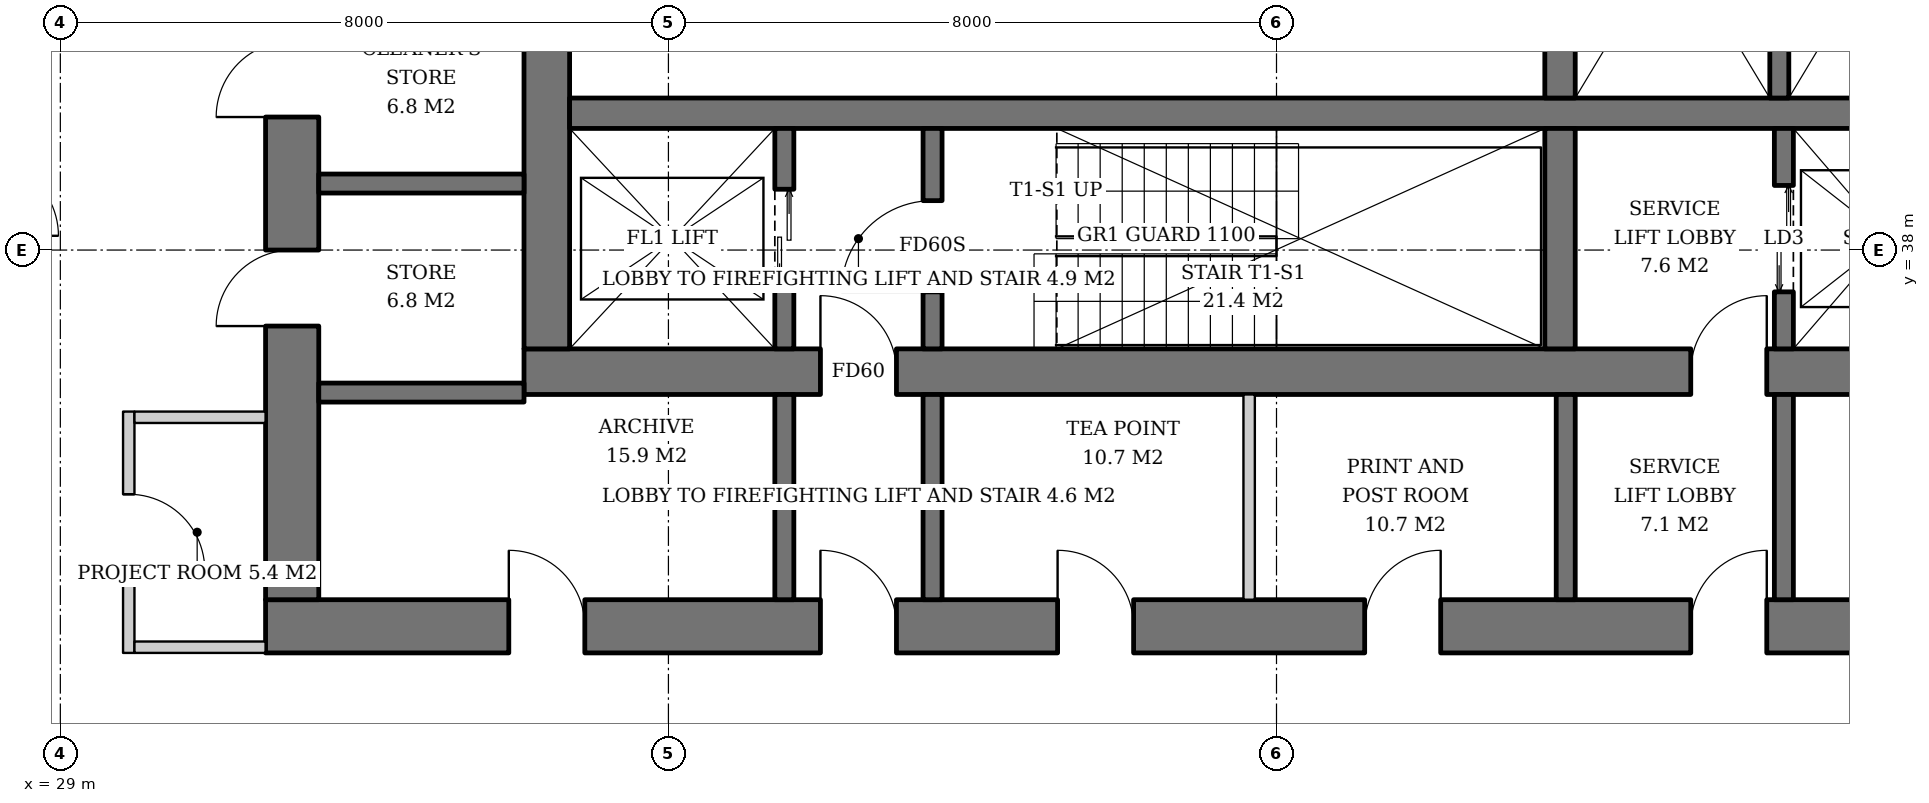
"""IFC4 building model, lengths in metres.
Left out: names, types, materials, properties, quantities, classifications, styles, units other than length and angle.
Written with IfcOpenShell. Run it as: python <this file> out.ifc"""

import sys

from ifc_helpers import new_model, si_unit, direction, frame, frame_2d, origin, place, context, subcontext, project, spatial, rectangle, extrude, element, fill, save


model = new_model("IFC4")
c1 = context("Model", 3, precision=1e-05, world=origin(), true_north=direction((0.0, 1.0)))
c2 = subcontext(c1, "Body", "Model", "MODEL_VIEW")
j1 = project(units=[si_unit("LENGTHUNIT", "METRE"), si_unit("PLANEANGLEUNIT", "RADIAN")], contexts=[c1])
p1 = place(None, origin())
s1 = spatial("IfcSite", under=j1, at=p1, CompositionType="ELEMENT")
p2 = place(p1, origin())
s2 = spatial("IfcBuilding", under=s1, at=p2, CompositionType="ELEMENT")
p3 = place(p2, frame((0.0, 0.0, 108.4)))
s3 = spatial("IfcBuildingStorey", under=s2, at=p3, CompositionType="ELEMENT", Elevation=108.4)
p4 = place(p3, frame((35.1, 36.4, 0.0), z_axis=(0.0, 0.0, 1.0), x_axis=(1.0, 0.0, 0.0)))
e1 = element("IfcWall", 1, at=p4, inside=s3, PredefinedType="SHEAR", context=c2, shape_type="SweptSolid", body=[
    extrude(rectangle(XDim=19.8, YDim=0.6, at=frame_2d((9.9, 0.0))), origin(), (0.0, 0.0, 1.0), 3.8),
])
p5 = place(p4, frame((3.9, 0.0, 0.0)))
e2 = element("IfcOpeningElement", 2, at=p5, cuts=e1, PredefinedType="OPENING", context=c2, shape_type="SweptSolid", body=[
    extrude(rectangle(XDim=1.0, YDim=2.1, at=frame_2d((0.5, 1.05))), frame((0.0, 0.31, 0.0), z_axis=(0.0, -1.0, 0.0), x_axis=(1.0, 0.0, 0.0)), (0.0, 0.0, 1.0), 0.62),
])
p6 = place(p4, frame((15.35, 0.0, 0.0)))
e3 = element("IfcOpeningElement", 3, at=p6, cuts=e1, PredefinedType="OPENING", context=c2, shape_type="SweptSolid", body=[
    extrude(rectangle(XDim=1.0, YDim=2.1, at=frame_2d((0.5, 1.05))), frame((0.0, 0.31, 0.0), z_axis=(0.0, -1.0, 0.0), x_axis=(1.0, 0.0, 0.0)), (0.0, 0.0, 1.0), 0.62),
])
p7 = place(p3, frame((35.4, 36.7, 0.0), z_axis=(0.0, 0.0, 1.0), x_axis=(0.0, 1.0, 0.0)))
e4 = element("IfcWall", 4, at=p7, inside=s3, PredefinedType="SHEAR", context=c2, shape_type="SweptSolid", body=[
    extrude(rectangle(XDim=18.6, YDim=0.6, at=frame_2d((9.3, 0.0))), origin(), (0.0, 0.0, 1.0), 3.8),
])
p8 = place(p7, frame((8.4, 0.0, 0.0)))
e5 = element("IfcOpeningElement", 5, at=p8, cuts=e4, PredefinedType="OPENING", context=c2, shape_type="SweptSolid", body=[
    extrude(rectangle(XDim=1.8, YDim=2.4, at=frame_2d((0.9, 1.2))), frame((0.0, 0.31, 0.0), z_axis=(0.0, -1.0, 0.0), x_axis=(1.0, 0.0, 0.0)), (0.0, 0.0, 1.0), 0.62),
])
p9 = place(p3, frame((31.7, 33.05, 0.0), z_axis=(0.0, 0.0, 1.0), x_axis=(1.0, 0.0, 0.0)))
e6 = element("IfcWall", 6, at=p9, inside=s3, PredefinedType="SHEAR", context=c2, shape_type="SweptSolid", body=[
    extrude(rectangle(XDim=26.6, YDim=0.7, at=frame_2d((13.3, 0.0))), origin(), (0.0, 0.0, 1.0), 3.8),
])
p10 = place(p9, frame((7.3, 0.0, 0.0)))
e7 = element("IfcOpeningElement", 7, at=p10, cuts=e6, PredefinedType="OPENING", context=c2, shape_type="SweptSolid", body=[
    extrude(rectangle(XDim=1.0, YDim=2.1, at=frame_2d((0.5, 1.05))), frame((0.0, 0.36, 0.0), z_axis=(0.0, -1.0, 0.0), x_axis=(1.0, 0.0, 0.0)), (0.0, 0.0, 1.0), 0.72),
])
p11 = place(p9, frame((18.75, 0.0, 0.0)))
e8 = element("IfcOpeningElement", 8, at=p11, cuts=e6, PredefinedType="OPENING", context=c2, shape_type="SweptSolid", body=[
    extrude(rectangle(XDim=1.0, YDim=2.1, at=frame_2d((0.5, 1.05))), frame((0.0, 0.36, 0.0), z_axis=(0.0, -1.0, 0.0), x_axis=(1.0, 0.0, 0.0)), (0.0, 0.0, 1.0), 0.72),
])
p12 = place(p9, frame((3.2, 0.0, 0.0)))
e9 = element("IfcOpeningElement", 9, at=p12, cuts=e6, PredefinedType="OPENING", context=c2, shape_type="SweptSolid", body=[
    extrude(rectangle(XDim=1.0, YDim=2.1, at=frame_2d((0.5, 1.05))), frame((0.0, 0.36, 0.0), z_axis=(0.0, -1.0, 0.0), x_axis=(1.0, 0.0, 0.0)), (0.0, 0.0, 1.0), 0.72),
])
p13 = place(p9, frame((10.42, 0.0, 0.0)))
e10 = element("IfcOpeningElement", 10, at=p13, cuts=e6, PredefinedType="OPENING", context=c2, shape_type="SweptSolid", body=[
    extrude(rectangle(XDim=1.0, YDim=2.1, at=frame_2d((0.5, 1.05))), frame((0.0, 0.36, 0.0), z_axis=(0.0, -1.0, 0.0), x_axis=(1.0, 0.0, 0.0)), (0.0, 0.0, 1.0), 0.72),
])
p14 = place(p9, frame((14.46, 0.0, 0.0)))
e11 = element("IfcOpeningElement", 11, at=p14, cuts=e6, PredefinedType="OPENING", context=c2, shape_type="SweptSolid", body=[
    extrude(rectangle(XDim=1.0, YDim=2.1, at=frame_2d((0.5, 1.05))), frame((0.0, 0.36, 0.0), z_axis=(0.0, -1.0, 0.0), x_axis=(1.0, 0.0, 0.0)), (0.0, 0.0, 1.0), 0.72),
])
p15 = place(p9, frame((22.5, 0.0, 0.0)))
e12 = element("IfcOpeningElement", 12, at=p15, cuts=e6, PredefinedType="OPENING", context=c2, shape_type="SweptSolid", body=[
    extrude(rectangle(XDim=1.0, YDim=2.1, at=frame_2d((0.5, 1.05))), frame((0.0, 0.36, 0.0), z_axis=(0.0, -1.0, 0.0), x_axis=(1.0, 0.0, 0.0)), (0.0, 0.0, 1.0), 0.72),
])
p16 = place(p3, frame((32.05, 33.4, 0.0), z_axis=(0.0, 0.0, 1.0), x_axis=(0.0, 1.0, 0.0)))
e13 = element("IfcWall", 13, at=p16, inside=s3, PredefinedType="SHEAR", context=c2, shape_type="SweptSolid", body=[
    extrude(rectangle(XDim=25.2, YDim=0.7, at=frame_2d((12.6, 0.0))), origin(), (0.0, 0.0, 1.0), 3.8),
])
p17 = place(p16, frame((11.7, 0.0, 0.0)))
e14 = element("IfcOpeningElement", 14, at=p17, cuts=e13, PredefinedType="OPENING", context=c2, shape_type="SweptSolid", body=[
    extrude(rectangle(XDim=1.8, YDim=2.4, at=frame_2d((0.9, 1.2))), frame((0.0, 0.36, 0.0), z_axis=(0.0, -1.0, 0.0), x_axis=(1.0, 0.0, 0.0)), (0.0, 0.0, 1.0), 0.72),
])
p18 = place(p16, frame((3.6, 0.0, 0.0)))
e15 = element("IfcOpeningElement", 15, at=p18, cuts=e13, PredefinedType="OPENING", context=c2, shape_type="SweptSolid", body=[
    extrude(rectangle(XDim=1.0, YDim=2.1, at=frame_2d((0.5, 1.05))), frame((0.0, 0.36, 0.0), z_axis=(0.0, -1.0, 0.0), x_axis=(1.0, 0.0, 0.0)), (0.0, 0.0, 1.0), 0.72),
])
p19 = place(p16, frame((6.35, 0.0, 0.0)))
e16 = element("IfcOpeningElement", 16, at=p19, cuts=e13, PredefinedType="OPENING", context=c2, shape_type="SweptSolid", body=[
    extrude(rectangle(XDim=1.0, YDim=2.1, at=frame_2d((0.5, 1.05))), frame((0.0, 0.36, 0.0), z_axis=(0.0, -1.0, 0.0), x_axis=(1.0, 0.0, 0.0)), (0.0, 0.0, 1.0), 0.72),
])
p20 = place(p16, frame((9.1, 0.0, 0.0)))
e17 = element("IfcOpeningElement", 17, at=p20, cuts=e13, PredefinedType="OPENING", context=c2, shape_type="SweptSolid", body=[
    extrude(rectangle(XDim=1.0, YDim=2.1, at=frame_2d((0.5, 1.05))), frame((0.0, 0.36, 0.0), z_axis=(0.0, -1.0, 0.0), x_axis=(1.0, 0.0, 0.0)), (0.0, 0.0, 1.0), 0.72),
])
p21 = place(p16, frame((15.1, 0.0, 0.0)))
e18 = element("IfcOpeningElement", 18, at=p21, cuts=e13, PredefinedType="OPENING", context=c2, shape_type="SweptSolid", body=[
    extrude(rectangle(XDim=1.0, YDim=2.1, at=frame_2d((0.5, 1.05))), frame((0.0, 0.36, 0.0), z_axis=(0.0, -1.0, 0.0), x_axis=(1.0, 0.0, 0.0)), (0.0, 0.0, 1.0), 0.72),
])
p22 = place(p16, frame((17.85, 0.0, 0.0)))
e19 = element("IfcOpeningElement", 19, at=p22, cuts=e13, PredefinedType="OPENING", context=c2, shape_type="SweptSolid", body=[
    extrude(rectangle(XDim=1.0, YDim=2.1, at=frame_2d((0.5, 1.05))), frame((0.0, 0.36, 0.0), z_axis=(0.0, -1.0, 0.0), x_axis=(1.0, 0.0, 0.0)), (0.0, 0.0, 1.0), 0.72),
])
p23 = place(p3, frame((35.7, 39.8, 0.0), z_axis=(0.0, 0.0, 1.0), x_axis=(1.0, 0.0, 0.0)))
e20 = element("IfcWall", 20, at=p23, inside=s3, PredefinedType="SHEAR", context=c2, shape_type="SweptSolid", body=[
    extrude(rectangle(XDim=18.6, YDim=0.4, at=frame_2d((9.3, 0.0))), origin(), (0.0, 0.0, 1.0), 3.8),
])
p24 = place(p3, frame((48.73, 36.7, 0.0), z_axis=(0.0, 0.0, 1.0), x_axis=(0.0, 1.0, 0.0)))
e21 = element("IfcWall", 21, at=p24, inside=s3, PredefinedType="SHEAR", context=c2, shape_type="SweptSolid", body=[
    extrude(rectangle(XDim=2.9, YDim=0.4, at=frame_2d((1.45, 0.0))), origin(), (0.0, 0.0, 1.0), 3.8),
])
p25 = place(p3, frame((48.73, 40.0, 0.0), z_axis=(0.0, 0.0, 1.0), x_axis=(0.0, 1.0, 0.0)))
e22 = element("IfcWall", 22, at=p25, inside=s3, PredefinedType="SHEAR", context=c2, shape_type="SweptSolid", body=[
    extrude(rectangle(XDim=12.0, YDim=0.4, at=frame_2d((6.0, 0.0))), origin(), (0.0, 0.0, 1.0), 3.8),
])
p26 = place(p3, frame((38.525, 36.7, 0.0), z_axis=(0.0, 0.0, 1.0), x_axis=(0.0, 1.0, 0.0)))
e23 = element("IfcWall", 23, at=p26, inside=s3, PredefinedType="SHEAR", context=c2, shape_type="SweptSolid", body=[
    extrude(rectangle(XDim=2.9, YDim=0.25, at=frame_2d((1.45, 0.0))), origin(), (0.0, 0.0, 1.0), 3.8),
])
p27 = place(p26, frame((0.8, 0.0, 0.0)))
e24 = element("IfcOpeningElement", 24, at=p27, cuts=e23, PredefinedType="OPENING", context=c2, shape_type="SweptSolid", body=[
    extrude(rectangle(XDim=1.3, YDim=2.2, at=frame_2d((0.65, 1.1))), frame((0.0, 0.135, 0.0), z_axis=(0.0, -1.0, 0.0), x_axis=(1.0, 0.0, 0.0)), (0.0, 0.0, 1.0), 0.27),
])
p28 = place(p3, frame((40.475, 36.7, 0.0), z_axis=(0.0, 0.0, 1.0), x_axis=(0.0, 1.0, 0.0)))
e25 = element("IfcWall", 25, at=p28, inside=s3, PredefinedType="SHEAR", context=c2, shape_type="SweptSolid", body=[
    extrude(rectangle(XDim=2.9, YDim=0.25, at=frame_2d((1.45, 0.0))), origin(), (0.0, 0.0, 1.0), 3.8),
])
p29 = place(p28, frame((0.75, 0.0, 0.0)))
e26 = element("IfcOpeningElement", 26, at=p29, cuts=e25, PredefinedType="OPENING", context=c2, shape_type="SweptSolid", body=[
    extrude(rectangle(XDim=1.2, YDim=2.1, at=frame_2d((0.6, 1.05))), frame((0.0, 0.135, 0.0), z_axis=(0.0, -1.0, 0.0), x_axis=(1.0, 0.0, 0.0)), (0.0, 0.0, 1.0), 0.27),
])
p30 = place(p3, frame((51.675, 36.7, 0.0), z_axis=(0.0, 0.0, 1.0), x_axis=(0.0, 1.0, 0.0)))
e27 = element("IfcWall", 27, at=p30, inside=s3, PredefinedType="SHEAR", context=c2, shape_type="SweptSolid", body=[
    extrude(rectangle(XDim=2.9, YDim=0.25, at=frame_2d((1.45, 0.0))), origin(), (0.0, 0.0, 1.0), 3.8),
])
p31 = place(p30, frame((0.75, 0.0, 0.0)))
e28 = element("IfcOpeningElement", 28, at=p31, cuts=e27, PredefinedType="OPENING", context=c2, shape_type="SweptSolid", body=[
    extrude(rectangle(XDim=1.4, YDim=2.4, at=frame_2d((0.7, 1.2))), frame((0.0, 0.135, 0.0), z_axis=(0.0, -1.0, 0.0), x_axis=(1.0, 0.0, 0.0)), (0.0, 0.0, 1.0), 0.27),
])
p32 = place(p3, frame((51.615, 44.25, 0.0), z_axis=(0.0, 0.0, 1.0), x_axis=(0.0, -1.0, 0.0)))
e29 = element("IfcWall", 29, at=p32, inside=s3, PredefinedType="SHEAR", context=c2, shape_type="SweptSolid", body=[
    extrude(rectangle(XDim=4.25, YDim=0.25, at=frame_2d((2.125, 0.0))), origin(), (0.0, 0.0, 1.0), 3.8),
])
for number, where, z_axis, x_axis in (
    (30, (32.4, 36.125, 0.0), (0.0, 0.0, 1.0), (1.0, 0.0, 0.0)),
    (31, (32.4, 38.875, 0.0), (0.0, 0.0, 1.0), (1.0, 0.0, 0.0)),
):
    element("IfcWall", number, at=place(p3, frame(where, z_axis=z_axis, x_axis=x_axis)), inside=s3, PredefinedType="SHEAR", context=c2, shape_type="SweptSolid", body=[
        extrude(rectangle(XDim=2.7, YDim=0.25, at=frame_2d((1.35, 0.0))), origin(), (0.0, 0.0, 1.0), 3.8),
    ])
for number, where, z_axis, x_axis in (
    (32, (38.525, 33.4, 0.0), (0.0, 0.0, 1.0), (0.0, 1.0, 0.0)),
    (33, (40.475, 33.4, 0.0), (0.0, 0.0, 1.0), (0.0, 1.0, 0.0)),
    (34, (48.805, 33.4, 0.0), (0.0, 0.0, 1.0), (0.0, 1.0, 0.0)),
    (35, (51.675, 33.4, 0.0), (0.0, 0.0, 1.0), (0.0, 1.0, 0.0)),
):
    element("IfcWall", number, at=place(p3, frame(where, z_axis=z_axis, x_axis=x_axis)), inside=s3, PredefinedType="SOLIDWALL", context=c2, shape_type="SweptSolid", body=[
        extrude(rectangle(XDim=2.7, YDim=0.25, at=frame_2d((1.35, 0.0))), origin(), (0.0, 0.0, 1.0), 3.62),
    ])
p33 = place(p3, frame((44.64, 33.4, 0.0), z_axis=(0.0, 0.0, 1.0), x_axis=(0.0, 1.0, 0.0)))
e36 = element("IfcWall", 36, at=p33, inside=s3, PredefinedType="SOLIDWALL", context=c2, shape_type="SweptSolid", body=[
    extrude(rectangle(XDim=2.7, YDim=0.15, at=frame_2d((1.35, 0.0))), origin(), (0.0, 0.0, 1.0), 3.62),
])
p34 = place(p3, frame((29.9, 35.875, 0.0), z_axis=(0.0, 0.0, 1.0), x_axis=(0.0, -1.0, 0.0)))
e37 = element("IfcWall", 37, at=p34, inside=s3, PredefinedType="PARTITIONING", context=c2, shape_type="SweptSolid", body=[
    extrude(rectangle(XDim=3.175, YDim=0.15, at=frame_2d((1.587, 0.0))), origin(), (0.0, 0.0, 1.0), 3.62),
])
p35 = place(p34, frame((1.087, 0.0, 0.0)))
e38 = element("IfcOpeningElement", 38, at=p35, cuts=e37, PredefinedType="OPENING", context=c2, shape_type="SweptSolid", body=[
    extrude(rectangle(XDim=1.0, YDim=2.1, at=frame_2d((0.5, 1.05))), frame((0.0, 0.085, 0.0), z_axis=(0.0, -1.0, 0.0), x_axis=(1.0, 0.0, 0.0)), (0.0, 0.0, 1.0), 0.17),
])
for number, where, z_axis, x_axis in (
    (39, (31.7, 35.8, 0.0), (0.0, 0.0, 1.0), (-1.0, 0.0, 0.0)),
    (40, (31.7, 32.775, 0.0), (0.0, 0.0, 1.0), (-1.0, 0.0, 0.0)),
):
    element("IfcWall", number, at=place(p3, frame(where, z_axis=z_axis, x_axis=x_axis)), inside=s3, PredefinedType="PARTITIONING", context=c2, shape_type="SweptSolid", body=[
        extrude(rectangle(XDim=1.725, YDim=0.15, at=frame_2d((0.862, 0.0))), origin(), (0.0, 0.0, 1.0), 3.62),
    ])
p36 = place(p27, origin())
e41 = element("IfcDoor", 41, at=p36, inside=s3, OperationType="DOUBLE_DOOR_SLIDING", PredefinedType="DOOR", context=c2, shape_type="SweptSolid", body=[
    extrude(rectangle(XDim=1.3, YDim=2.2, at=frame_2d((0.65, 1.1))), frame((0.0, 0.025, 0.0), z_axis=(0.0, -1.0, 0.0), x_axis=(1.0, 0.0, 0.0)), (0.0, 0.0, 1.0), 0.05),
])
fill(e24, e41)
p37 = place(p29, origin())
e42 = element("IfcDoor", 42, at=p37, inside=s3, OperationType="SINGLE_SWING_LEFT", PredefinedType="DOOR", context=c2, shape_type="SweptSolid", body=[
    extrude(rectangle(XDim=1.2, YDim=2.1, at=frame_2d((0.6, 1.05))), frame((0.0, 0.025, 0.0), z_axis=(0.0, -1.0, 0.0), x_axis=(1.0, 0.0, 0.0)), (0.0, 0.0, 1.0), 0.05),
])
fill(e26, e42)
p38 = place(p31, origin())
e43 = element("IfcDoor", 43, at=p38, inside=s3, OperationType="DOUBLE_DOOR_SLIDING", PredefinedType="DOOR", context=c2, shape_type="SweptSolid", body=[
    extrude(rectangle(XDim=1.4, YDim=2.4, at=frame_2d((0.7, 1.2))), frame((0.0, 0.025, 0.0), z_axis=(0.0, -1.0, 0.0), x_axis=(1.0, 0.0, 0.0)), (0.0, 0.0, 1.0), 0.05),
])
fill(e28, e43)
p39 = place(p5, origin())
e44 = element("IfcDoor", 44, at=p39, inside=s3, OperationType="SINGLE_SWING_LEFT", PredefinedType="DOOR", context=c2, shape_type="SweptSolid", body=[
    extrude(rectangle(XDim=1.0, YDim=2.1, at=frame_2d((0.5, 1.05))), frame((0.0, 0.025, 0.0), z_axis=(0.0, -1.0, 0.0), x_axis=(1.0, 0.0, 0.0)), (0.0, 0.0, 1.0), 0.05),
])
fill(e2, e44)
p40 = place(p6, origin())
e45 = element("IfcDoor", 45, at=p40, inside=s3, OperationType="SINGLE_SWING_RIGHT", PredefinedType="DOOR", context=c2, shape_type="SweptSolid", body=[
    extrude(rectangle(XDim=1.0, YDim=2.1, at=frame_2d((0.5, 1.05))), frame((0.0, 0.025, 0.0), z_axis=(0.0, -1.0, 0.0), x_axis=(1.0, 0.0, 0.0)), (0.0, 0.0, 1.0), 0.05),
])
fill(e3, e45)
p41 = place(p10, origin())
e46 = element("IfcDoor", 46, at=p41, inside=s3, OperationType="SINGLE_SWING_LEFT", PredefinedType="DOOR", context=c2, shape_type="SweptSolid", body=[
    extrude(rectangle(XDim=1.0, YDim=2.1, at=frame_2d((0.5, 1.05))), frame((0.0, 0.025, 0.0), z_axis=(0.0, -1.0, 0.0), x_axis=(1.0, 0.0, 0.0)), (0.0, 0.0, 1.0), 0.05),
])
fill(e7, e46)
p42 = place(p11, origin())
e47 = element("IfcDoor", 47, at=p42, inside=s3, OperationType="SINGLE_SWING_RIGHT", PredefinedType="DOOR", context=c2, shape_type="SweptSolid", body=[
    extrude(rectangle(XDim=1.0, YDim=2.1, at=frame_2d((0.5, 1.05))), frame((0.0, 0.025, 0.0), z_axis=(0.0, -1.0, 0.0), x_axis=(1.0, 0.0, 0.0)), (0.0, 0.0, 1.0), 0.05),
])
fill(e8, e47)
p43 = place(p18, origin())
e48 = element("IfcDoor", 48, at=p43, inside=s3, OperationType="SINGLE_SWING_LEFT", PredefinedType="DOOR", context=c2, shape_type="SweptSolid", body=[
    extrude(rectangle(XDim=1.0, YDim=2.1, at=frame_2d((0.5, 1.05))), frame((0.0, -0.29, 0.0), z_axis=(0.0, -1.0, 0.0), x_axis=(1.0, 0.0, 0.0)), (0.0, 0.0, 1.0), 0.05),
])
fill(e15, e48)
p44 = place(p19, origin())
e49 = element("IfcDoor", 49, at=p44, inside=s3, OperationType="SINGLE_SWING_LEFT", PredefinedType="DOOR", context=c2, shape_type="SweptSolid", body=[
    extrude(rectangle(XDim=1.0, YDim=2.1, at=frame_2d((0.5, 1.05))), frame((0.0, -0.29, 0.0), z_axis=(0.0, -1.0, 0.0), x_axis=(1.0, 0.0, 0.0)), (0.0, 0.0, 1.0), 0.05),
])
fill(e16, e49)
p45 = place(p12, origin())
e50 = element("IfcDoor", 50, at=p45, inside=s3, OperationType="SINGLE_SWING_LEFT", PredefinedType="DOOR", context=c2, shape_type="SweptSolid", body=[
    extrude(rectangle(XDim=1.0, YDim=2.1, at=frame_2d((0.5, 1.05))), frame((0.0, 0.34, 0.0), z_axis=(0.0, -1.0, 0.0), x_axis=(1.0, 0.0, 0.0)), (0.0, 0.0, 1.0), 0.05),
])
fill(e9, e50)
p46 = place(p13, origin())
e51 = element("IfcDoor", 51, at=p46, inside=s3, OperationType="SINGLE_SWING_LEFT", PredefinedType="DOOR", context=c2, shape_type="SweptSolid", body=[
    extrude(rectangle(XDim=1.0, YDim=2.1, at=frame_2d((0.5, 1.05))), frame((0.0, 0.34, 0.0), z_axis=(0.0, -1.0, 0.0), x_axis=(1.0, 0.0, 0.0)), (0.0, 0.0, 1.0), 0.05),
])
fill(e10, e51)
p47 = place(p14, origin())
e52 = element("IfcDoor", 52, at=p47, inside=s3, OperationType="SINGLE_SWING_RIGHT", PredefinedType="DOOR", context=c2, shape_type="SweptSolid", body=[
    extrude(rectangle(XDim=1.0, YDim=2.1, at=frame_2d((0.5, 1.05))), frame((0.0, 0.34, 0.0), z_axis=(0.0, -1.0, 0.0), x_axis=(1.0, 0.0, 0.0)), (0.0, 0.0, 1.0), 0.05),
])
fill(e11, e52)
p48 = place(p35, origin())
e53 = element("IfcDoor", 53, at=p48, inside=s3, OperationType="SINGLE_SWING_RIGHT", PredefinedType="DOOR", context=c2, shape_type="SweptSolid", body=[
    extrude(rectangle(XDim=1.0, YDim=2.1, at=frame_2d((0.5, 1.05))), frame((0.0, 0.025, 0.0), z_axis=(0.0, -1.0, 0.0), x_axis=(1.0, 0.0, 0.0)), (0.0, 0.0, 1.0), 0.05),
])
fill(e38, e53)
save(model, sys.argv[1])
